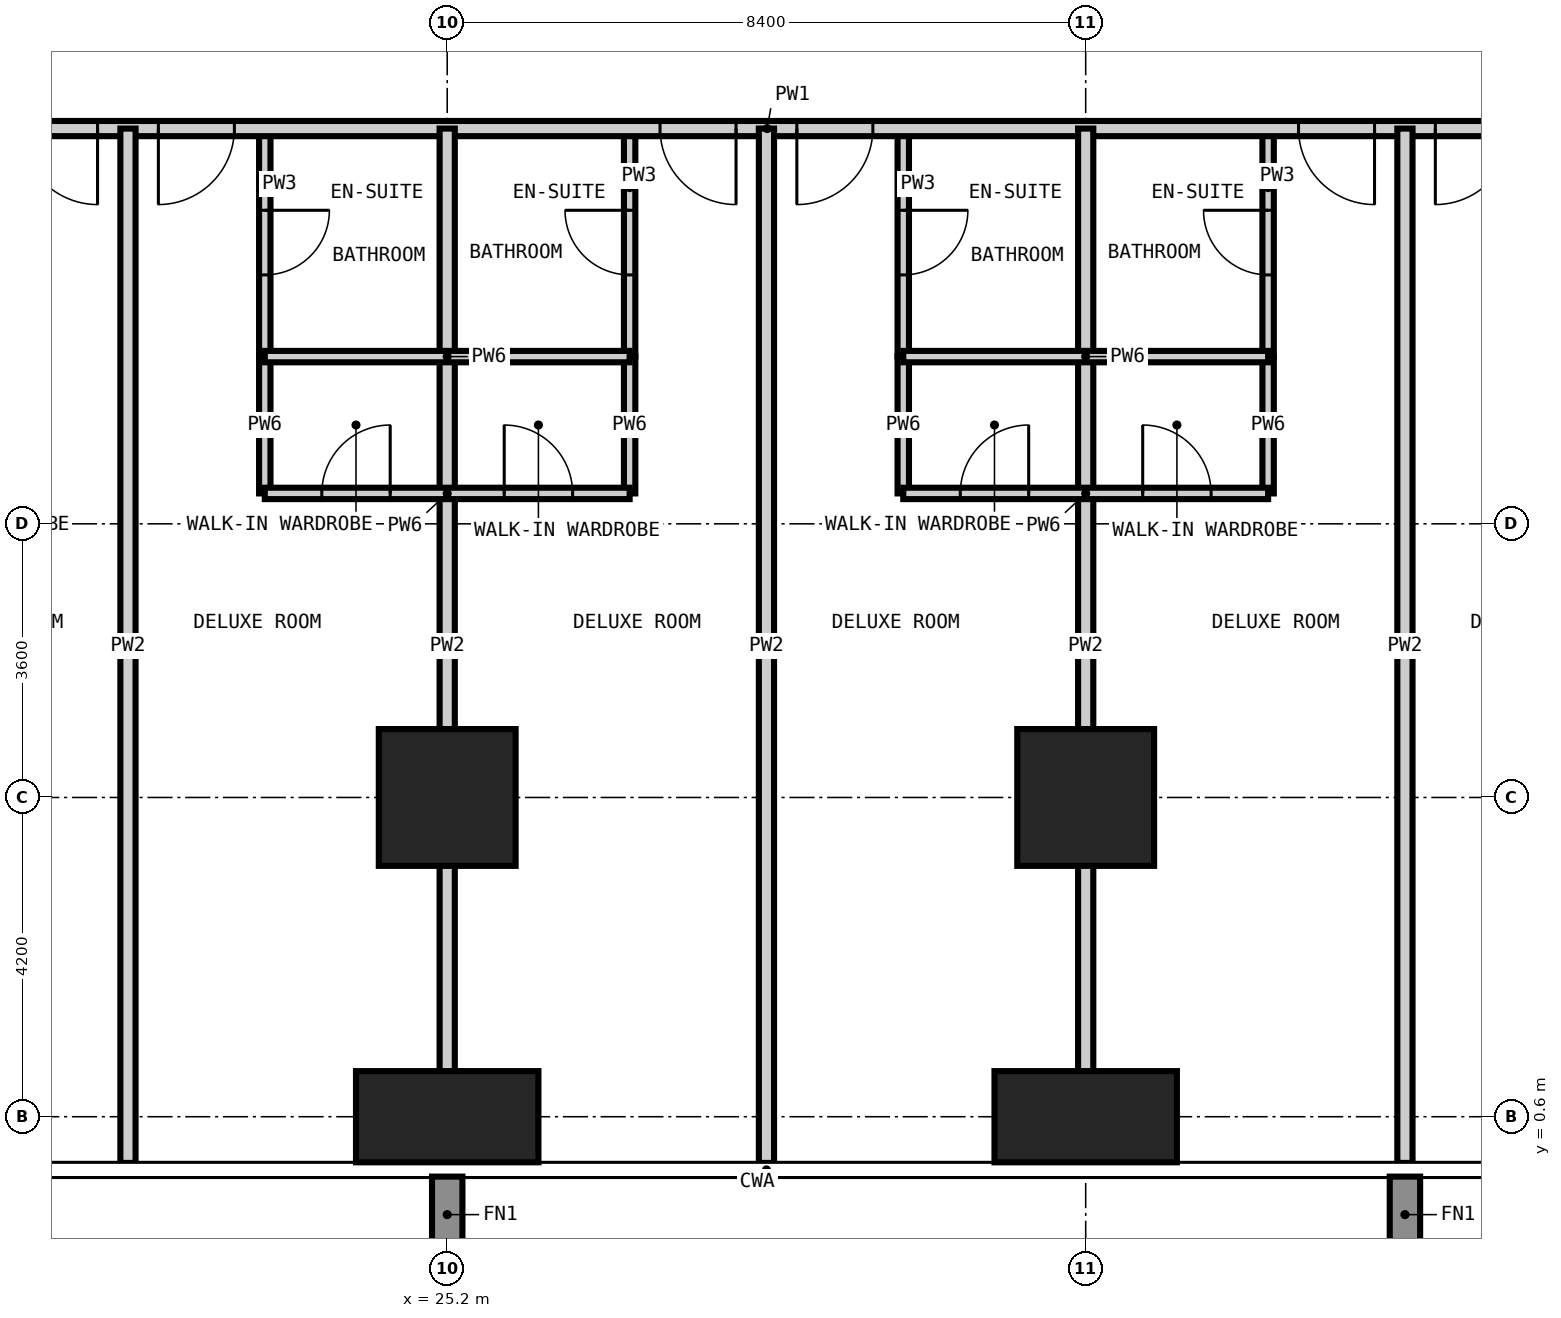
"""IFC4 building model, lengths in metres.
Left out: names, types, materials, properties, quantities, classifications, styles, units other than length and angle.
Written with IfcOpenShell. Run it as: python <this file> out.ifc"""

import sys

from ifc_helpers import new_model, si_unit, direction, frame, frame_2d, origin, origin_2d, place, context, subcontext, project, spatial, rectangle, extrude, element, fill, save


model = new_model("IFC4")
c1 = context("Model", 3, precision=1e-05, world=origin(), true_north=direction((0.0, 1.0)))
c2 = subcontext(c1, "Body", "Model", "MODEL_VIEW")
j1 = project(units=[si_unit("LENGTHUNIT", "METRE"), si_unit("PLANEANGLEUNIT", "RADIAN")], contexts=[c1])
p1 = place(None, origin())
s1 = spatial("IfcSite", under=j1, at=p1, CompositionType="ELEMENT")
p2 = place(p1, origin())
s2 = spatial("IfcBuilding", under=s1, at=p2, CompositionType="ELEMENT")
p3 = place(p2, frame((0.0, 0.0, 30.6)))
s3 = spatial("IfcBuildingStorey", under=s2, at=p3, CompositionType="ELEMENT", Elevation=30.6)
p4 = place(p3, frame((25.2, 0.6, -0.35), z_axis=(0.0, 0.0, 1.0), x_axis=(1.0, 0.0, 0.0)))
e1 = element("IfcColumn", 1, at=p4, inside=s3, PredefinedType="COLUMN", context=c2, shape_type="SweptSolid", body=[
    extrude(rectangle(XDim=2.4, YDim=1.2, at=origin_2d()), origin(), (0.0, 0.0, 1.0), 3.6),
])
p5 = place(p3, frame((25.2, 4.8, -0.35), z_axis=(0.0, 0.0, 1.0), x_axis=(1.0, 0.0, 0.0)))
e2 = element("IfcColumn", 2, at=p5, inside=s3, PredefinedType="COLUMN", context=c2, shape_type="SweptSolid", body=[
    extrude(rectangle(XDim=1.8, YDim=1.8, at=origin_2d()), origin(), (0.0, 0.0, 1.0), 3.6),
])
p6 = place(p3, frame((33.6, 0.6, -0.35), z_axis=(0.0, 0.0, 1.0), x_axis=(1.0, 0.0, 0.0)))
e3 = element("IfcColumn", 3, at=p6, inside=s3, PredefinedType="COLUMN", context=c2, shape_type="SweptSolid", body=[
    extrude(rectangle(XDim=2.4, YDim=1.2, at=origin_2d()), origin(), (0.0, 0.0, 1.0), 3.6),
])
p7 = place(p3, frame((33.6, 4.8, -0.35), z_axis=(0.0, 0.0, 1.0), x_axis=(1.0, 0.0, 0.0)))
e4 = element("IfcColumn", 4, at=p7, inside=s3, PredefinedType="COLUMN", context=c2, shape_type="SweptSolid", body=[
    extrude(rectangle(XDim=1.8, YDim=1.8, at=origin_2d()), origin(), (0.0, 0.0, 1.0), 3.6),
])
p8 = place(p3, frame((22.8, 10.6, 0.0), z_axis=(0.0, 0.0, 1.0), x_axis=(0.0, 1.0, 0.0)))
e5 = element("IfcWall", 5, at=p8, inside=s3, PredefinedType="PARTITIONING", context=c2, shape_type="SweptSolid", body=[
    extrude(rectangle(XDim=3.0, YDim=0.15, at=frame_2d((1.5, 0.0))), origin(), (0.0, 0.0, 1.0), 3.25),
])
p9 = place(p8, frame((1.075, 0.0, 0.0)))
e6 = element("IfcOpeningElement", 6, at=p9, cuts=e5, PredefinedType="OPENING", context=c2, shape_type="SweptSolid", body=[
    extrude(rectangle(XDim=0.85, YDim=2.1, at=frame_2d((0.425, 1.05))), frame((0.0, 0.085, 0.0), z_axis=(0.0, -1.0, 0.0), x_axis=(1.0, 0.0, 0.0)), (0.0, 0.0, 1.0), 0.17),
])
p10 = place(p3, frame((27.6, 10.6, 0.0), z_axis=(0.0, 0.0, 1.0), x_axis=(0.0, 1.0, 0.0)))
e7 = element("IfcWall", 7, at=p10, inside=s3, PredefinedType="PARTITIONING", context=c2, shape_type="SweptSolid", body=[
    extrude(rectangle(XDim=3.0, YDim=0.15, at=frame_2d((1.5, 0.0))), origin(), (0.0, 0.0, 1.0), 3.25),
])
p11 = place(p10, frame((1.075, 0.0, 0.0)))
e8 = element("IfcOpeningElement", 8, at=p11, cuts=e7, PredefinedType="OPENING", context=c2, shape_type="SweptSolid", body=[
    extrude(rectangle(XDim=0.85, YDim=2.1, at=frame_2d((0.425, 1.05))), frame((0.0, 0.085, 0.0), z_axis=(0.0, -1.0, 0.0), x_axis=(1.0, 0.0, 0.0)), (0.0, 0.0, 1.0), 0.17),
])
p12 = place(p3, frame((31.2, 10.6, 0.0), z_axis=(0.0, 0.0, 1.0), x_axis=(0.0, 1.0, 0.0)))
e9 = element("IfcWall", 9, at=p12, inside=s3, PredefinedType="PARTITIONING", context=c2, shape_type="SweptSolid", body=[
    extrude(rectangle(XDim=3.0, YDim=0.15, at=frame_2d((1.5, 0.0))), origin(), (0.0, 0.0, 1.0), 3.25),
])
p13 = place(p12, frame((1.075, 0.0, 0.0)))
e10 = element("IfcOpeningElement", 10, at=p13, cuts=e9, PredefinedType="OPENING", context=c2, shape_type="SweptSolid", body=[
    extrude(rectangle(XDim=0.85, YDim=2.1, at=frame_2d((0.425, 1.05))), frame((0.0, 0.085, 0.0), z_axis=(0.0, -1.0, 0.0), x_axis=(1.0, 0.0, 0.0)), (0.0, 0.0, 1.0), 0.17),
])
p14 = place(p3, frame((36.0, 10.6, 0.0), z_axis=(0.0, 0.0, 1.0), x_axis=(0.0, 1.0, 0.0)))
e11 = element("IfcWall", 11, at=p14, inside=s3, PredefinedType="PARTITIONING", context=c2, shape_type="SweptSolid", body=[
    extrude(rectangle(XDim=3.0, YDim=0.15, at=frame_2d((1.5, 0.0))), origin(), (0.0, 0.0, 1.0), 3.25),
])
p15 = place(p14, frame((1.075, 0.0, 0.0)))
e12 = element("IfcOpeningElement", 12, at=p15, cuts=e11, PredefinedType="OPENING", context=c2, shape_type="SweptSolid", body=[
    extrude(rectangle(XDim=0.85, YDim=2.1, at=frame_2d((0.425, 1.05))), frame((0.0, 0.085, 0.0), z_axis=(0.0, -1.0, 0.0), x_axis=(1.0, 0.0, 0.0)), (0.0, 0.0, 1.0), 0.17),
])
p16 = place(p3, frame((45.5, 13.6, 0.0), z_axis=(0.0, 0.0, 1.0), x_axis=(-1.0, 0.0, 0.0)))
e13 = element("IfcWall", 13, at=p16, inside=s3, PredefinedType="PARTITIONING", context=c2, shape_type="SweptSolid", body=[
    extrude(rectangle(XDim=31.9, YDim=0.2, at=frame_2d((15.95, 0.0))), origin(), (0.0, 0.0, 1.0), 3.25),
])
p17 = place(p16, frame((24.9, 0.0, 0.0)))
e14 = element("IfcOpeningElement", 14, at=p17, cuts=e13, PredefinedType="OPENING", context=c2, shape_type="SweptSolid", body=[
    extrude(rectangle(XDim=1.0, YDim=2.2, at=frame_2d((0.5, 1.1))), frame((0.0, 0.11, 0.0), z_axis=(0.0, -1.0, 0.0), x_axis=(1.0, 0.0, 0.0)), (0.0, 0.0, 1.0), 0.22),
])
p18 = place(p16, frame((23.1, 0.0, 0.0)))
e15 = element("IfcOpeningElement", 15, at=p18, cuts=e13, PredefinedType="OPENING", context=c2, shape_type="SweptSolid", body=[
    extrude(rectangle(XDim=1.0, YDim=2.2, at=frame_2d((0.5, 1.1))), frame((0.0, 0.11, 0.0), z_axis=(0.0, -1.0, 0.0), x_axis=(1.0, 0.0, 0.0)), (0.0, 0.0, 1.0), 0.22),
])
p19 = place(p16, frame((16.5, 0.0, 0.0)))
e16 = element("IfcOpeningElement", 16, at=p19, cuts=e13, PredefinedType="OPENING", context=c2, shape_type="SweptSolid", body=[
    extrude(rectangle(XDim=1.0, YDim=2.2, at=frame_2d((0.5, 1.1))), frame((0.0, 0.11, 0.0), z_axis=(0.0, -1.0, 0.0), x_axis=(1.0, 0.0, 0.0)), (0.0, 0.0, 1.0), 0.22),
])
p20 = place(p16, frame((14.7, 0.0, 0.0)))
e17 = element("IfcOpeningElement", 17, at=p20, cuts=e13, PredefinedType="OPENING", context=c2, shape_type="SweptSolid", body=[
    extrude(rectangle(XDim=1.0, YDim=2.2, at=frame_2d((0.5, 1.1))), frame((0.0, 0.11, 0.0), z_axis=(0.0, -1.0, 0.0), x_axis=(1.0, 0.0, 0.0)), (0.0, 0.0, 1.0), 0.22),
])
p21 = place(p16, frame((8.1, 0.0, 0.0)))
e18 = element("IfcOpeningElement", 18, at=p21, cuts=e13, PredefinedType="OPENING", context=c2, shape_type="SweptSolid", body=[
    extrude(rectangle(XDim=1.0, YDim=2.2, at=frame_2d((0.5, 1.1))), frame((0.0, 0.11, 0.0), z_axis=(0.0, -1.0, 0.0), x_axis=(1.0, 0.0, 0.0)), (0.0, 0.0, 1.0), 0.22),
])
p22 = place(p16, frame((6.3, 0.0, 0.0)))
e19 = element("IfcOpeningElement", 19, at=p22, cuts=e13, PredefinedType="OPENING", context=c2, shape_type="SweptSolid", body=[
    extrude(rectangle(XDim=1.0, YDim=2.2, at=frame_2d((0.5, 1.1))), frame((0.0, 0.11, 0.0), z_axis=(0.0, -1.0, 0.0), x_axis=(1.0, 0.0, 0.0)), (0.0, 0.0, 1.0), 0.22),
])
for number, where, z_axis, x_axis in (
    (20, (21.0, -0.008, 0.0), (0.0, 0.0, 1.0), (0.0, 1.0, 0.0)),
    (21, (25.2, -0.008, 0.0), (0.0, 0.0, 1.0), (0.0, 1.0, 0.0)),
    (22, (29.4, -0.008, 0.0), (0.0, 0.0, 1.0), (0.0, 1.0, 0.0)),
    (23, (33.6, -0.008, 0.0), (0.0, 0.0, 1.0), (0.0, 1.0, 0.0)),
    (24, (37.8, -0.008, 0.0), (0.0, 0.0, 1.0), (0.0, 1.0, 0.0)),
):
    element("IfcWall", number, at=place(p3, frame(where, z_axis=z_axis, x_axis=x_axis)), inside=s3, PredefinedType="PARTITIONING", context=c2, shape_type="SweptSolid", body=[
        extrude(rectangle(XDim=13.608, YDim=0.2, at=frame_2d((6.804, 0.0))), origin(), (0.0, 0.0, 1.0), 3.25),
    ])
for number, where, z_axis, x_axis in (
    (25, (22.8, 8.8, 0.0), (0.0, 0.0, 1.0), (0.0, 1.0, 0.0)),
    (26, (27.6, 8.8, 0.0), (0.0, 0.0, 1.0), (0.0, 1.0, 0.0)),
    (27, (31.2, 8.8, 0.0), (0.0, 0.0, 1.0), (0.0, 1.0, 0.0)),
    (28, (36.0, 8.8, 0.0), (0.0, 0.0, 1.0), (0.0, 1.0, 0.0)),
):
    element("IfcWall", number, at=place(p3, frame(where, z_axis=z_axis, x_axis=x_axis)), inside=s3, PredefinedType="PARTITIONING", context=c2, shape_type="SweptSolid", body=[
        extrude(rectangle(XDim=1.8, YDim=0.15, at=frame_2d((0.9, 0.0))), origin(), (0.0, 0.0, 1.0), 3.25),
    ])
p23 = place(p3, frame((22.8, 8.8, 0.0), z_axis=(0.0, 0.0, 1.0), x_axis=(1.0, 0.0, 0.0)))
e29 = element("IfcWall", 29, at=p23, inside=s3, PredefinedType="PARTITIONING", context=c2, shape_type="SweptSolid", body=[
    extrude(rectangle(XDim=4.8, YDim=0.15, at=frame_2d((2.4, 0.0))), origin(), (0.0, 0.0, 1.0), 3.25),
])
p24 = place(p23, frame((0.75, 0.0, 0.0)))
e30 = element("IfcOpeningElement", 30, at=p24, cuts=e29, PredefinedType="OPENING", context=c2, shape_type="SweptSolid", body=[
    extrude(rectangle(XDim=0.9, YDim=2.1, at=frame_2d((0.45, 1.05))), frame((0.0, 0.085, 0.0), z_axis=(0.0, -1.0, 0.0), x_axis=(1.0, 0.0, 0.0)), (0.0, 0.0, 1.0), 0.17),
])
p25 = place(p23, frame((3.15, 0.0, 0.0)))
e31 = element("IfcOpeningElement", 31, at=p25, cuts=e29, PredefinedType="OPENING", context=c2, shape_type="SweptSolid", body=[
    extrude(rectangle(XDim=0.9, YDim=2.1, at=frame_2d((0.45, 1.05))), frame((0.0, 0.085, 0.0), z_axis=(0.0, -1.0, 0.0), x_axis=(1.0, 0.0, 0.0)), (0.0, 0.0, 1.0), 0.17),
])
p26 = place(p3, frame((31.2, 8.8, 0.0), z_axis=(0.0, 0.0, 1.0), x_axis=(1.0, 0.0, 0.0)))
e32 = element("IfcWall", 32, at=p26, inside=s3, PredefinedType="PARTITIONING", context=c2, shape_type="SweptSolid", body=[
    extrude(rectangle(XDim=4.8, YDim=0.15, at=frame_2d((2.4, 0.0))), origin(), (0.0, 0.0, 1.0), 3.25),
])
p27 = place(p26, frame((0.75, 0.0, 0.0)))
e33 = element("IfcOpeningElement", 33, at=p27, cuts=e32, PredefinedType="OPENING", context=c2, shape_type="SweptSolid", body=[
    extrude(rectangle(XDim=0.9, YDim=2.1, at=frame_2d((0.45, 1.05))), frame((0.0, 0.085, 0.0), z_axis=(0.0, -1.0, 0.0), x_axis=(1.0, 0.0, 0.0)), (0.0, 0.0, 1.0), 0.17),
])
p28 = place(p26, frame((3.15, 0.0, 0.0)))
e34 = element("IfcOpeningElement", 34, at=p28, cuts=e32, PredefinedType="OPENING", context=c2, shape_type="SweptSolid", body=[
    extrude(rectangle(XDim=0.9, YDim=2.1, at=frame_2d((0.45, 1.05))), frame((0.0, 0.085, 0.0), z_axis=(0.0, -1.0, 0.0), x_axis=(1.0, 0.0, 0.0)), (0.0, 0.0, 1.0), 0.17),
])
for number, where, z_axis, x_axis in (
    (35, (22.8, 10.6, 0.0), (0.0, 0.0, 1.0), (1.0, 0.0, 0.0)),
    (36, (31.2, 10.6, 0.0), (0.0, 0.0, 1.0), (1.0, 0.0, 0.0)),
):
    element("IfcWall", number, at=place(p3, frame(where, z_axis=z_axis, x_axis=x_axis)), inside=s3, PredefinedType="PARTITIONING", context=c2, shape_type="SweptSolid", body=[
        extrude(rectangle(XDim=4.8, YDim=0.15, at=frame_2d((2.4, 0.0))), origin(), (0.0, 0.0, 1.0), 3.25),
    ])
p29 = place(p17, origin())
e37 = element("IfcDoor", 37, at=p29, inside=s3, OperationType="SINGLE_SWING_LEFT", PredefinedType="DOOR", context=c2, shape_type="SweptSolid", body=[
    extrude(rectangle(XDim=1.0, YDim=2.2, at=frame_2d((0.5, 1.1))), frame((0.0, 0.025, 0.0), z_axis=(0.0, -1.0, 0.0), x_axis=(1.0, 0.0, 0.0)), (0.0, 0.0, 1.0), 0.05),
])
fill(e14, e37)
p30 = place(p18, origin())
e38 = element("IfcDoor", 38, at=p30, inside=s3, OperationType="SINGLE_SWING_RIGHT", PredefinedType="DOOR", context=c2, shape_type="SweptSolid", body=[
    extrude(rectangle(XDim=1.0, YDim=2.2, at=frame_2d((0.5, 1.1))), frame((0.0, 0.025, 0.0), z_axis=(0.0, -1.0, 0.0), x_axis=(1.0, 0.0, 0.0)), (0.0, 0.0, 1.0), 0.05),
])
fill(e15, e38)
p31 = place(p9, frame((0.85, 0.0, 0.0), z_axis=(0.0, 0.0, 1.0), x_axis=(-1.0, 0.0, 0.0)))
e39 = element("IfcDoor", 39, at=p31, inside=s3, OperationType="SINGLE_SWING_LEFT", PredefinedType="DOOR", context=c2, shape_type="SweptSolid", body=[
    extrude(rectangle(XDim=0.85, YDim=2.1, at=frame_2d((0.425, 1.05))), frame((0.0, 0.025, 0.0), z_axis=(0.0, -1.0, 0.0), x_axis=(1.0, 0.0, 0.0)), (0.0, 0.0, 1.0), 0.05),
])
fill(e6, e39)
p32 = place(p24, origin())
e40 = element("IfcDoor", 40, at=p32, inside=s3, OperationType="SINGLE_SWING_RIGHT", PredefinedType="DOOR", context=c2, shape_type="SweptSolid", body=[
    extrude(rectangle(XDim=0.9, YDim=2.1, at=frame_2d((0.45, 1.05))), frame((0.0, 0.025, 0.0), z_axis=(0.0, -1.0, 0.0), x_axis=(1.0, 0.0, 0.0)), (0.0, 0.0, 1.0), 0.05),
])
fill(e30, e40)
p33 = place(p19, origin())
e41 = element("IfcDoor", 41, at=p33, inside=s3, OperationType="SINGLE_SWING_LEFT", PredefinedType="DOOR", context=c2, shape_type="SweptSolid", body=[
    extrude(rectangle(XDim=1.0, YDim=2.2, at=frame_2d((0.5, 1.1))), frame((0.0, 0.025, 0.0), z_axis=(0.0, -1.0, 0.0), x_axis=(1.0, 0.0, 0.0)), (0.0, 0.0, 1.0), 0.05),
])
fill(e16, e41)
p34 = place(p11, origin())
e42 = element("IfcDoor", 42, at=p34, inside=s3, OperationType="SINGLE_SWING_RIGHT", PredefinedType="DOOR", context=c2, shape_type="SweptSolid", body=[
    extrude(rectangle(XDim=0.85, YDim=2.1, at=frame_2d((0.425, 1.05))), frame((0.0, 0.025, 0.0), z_axis=(0.0, -1.0, 0.0), x_axis=(1.0, 0.0, 0.0)), (0.0, 0.0, 1.0), 0.05),
])
fill(e8, e42)
p35 = place(p25, origin())
e43 = element("IfcDoor", 43, at=p35, inside=s3, OperationType="SINGLE_SWING_LEFT", PredefinedType="DOOR", context=c2, shape_type="SweptSolid", body=[
    extrude(rectangle(XDim=0.9, YDim=2.1, at=frame_2d((0.45, 1.05))), frame((0.0, 0.025, 0.0), z_axis=(0.0, -1.0, 0.0), x_axis=(1.0, 0.0, 0.0)), (0.0, 0.0, 1.0), 0.05),
])
fill(e31, e43)
p36 = place(p20, origin())
e44 = element("IfcDoor", 44, at=p36, inside=s3, OperationType="SINGLE_SWING_RIGHT", PredefinedType="DOOR", context=c2, shape_type="SweptSolid", body=[
    extrude(rectangle(XDim=1.0, YDim=2.2, at=frame_2d((0.5, 1.1))), frame((0.0, 0.025, 0.0), z_axis=(0.0, -1.0, 0.0), x_axis=(1.0, 0.0, 0.0)), (0.0, 0.0, 1.0), 0.05),
])
fill(e17, e44)
p37 = place(p13, frame((0.85, 0.0, 0.0), z_axis=(0.0, 0.0, 1.0), x_axis=(-1.0, 0.0, 0.0)))
e45 = element("IfcDoor", 45, at=p37, inside=s3, OperationType="SINGLE_SWING_LEFT", PredefinedType="DOOR", context=c2, shape_type="SweptSolid", body=[
    extrude(rectangle(XDim=0.85, YDim=2.1, at=frame_2d((0.425, 1.05))), frame((0.0, 0.025, 0.0), z_axis=(0.0, -1.0, 0.0), x_axis=(1.0, 0.0, 0.0)), (0.0, 0.0, 1.0), 0.05),
])
fill(e10, e45)
p38 = place(p27, origin())
e46 = element("IfcDoor", 46, at=p38, inside=s3, OperationType="SINGLE_SWING_RIGHT", PredefinedType="DOOR", context=c2, shape_type="SweptSolid", body=[
    extrude(rectangle(XDim=0.9, YDim=2.1, at=frame_2d((0.45, 1.05))), frame((0.0, 0.025, 0.0), z_axis=(0.0, -1.0, 0.0), x_axis=(1.0, 0.0, 0.0)), (0.0, 0.0, 1.0), 0.05),
])
fill(e33, e46)
p39 = place(p21, origin())
e47 = element("IfcDoor", 47, at=p39, inside=s3, OperationType="SINGLE_SWING_LEFT", PredefinedType="DOOR", context=c2, shape_type="SweptSolid", body=[
    extrude(rectangle(XDim=1.0, YDim=2.2, at=frame_2d((0.5, 1.1))), frame((0.0, 0.025, 0.0), z_axis=(0.0, -1.0, 0.0), x_axis=(1.0, 0.0, 0.0)), (0.0, 0.0, 1.0), 0.05),
])
fill(e18, e47)
p40 = place(p15, origin())
e48 = element("IfcDoor", 48, at=p40, inside=s3, OperationType="SINGLE_SWING_RIGHT", PredefinedType="DOOR", context=c2, shape_type="SweptSolid", body=[
    extrude(rectangle(XDim=0.85, YDim=2.1, at=frame_2d((0.425, 1.05))), frame((0.0, 0.025, 0.0), z_axis=(0.0, -1.0, 0.0), x_axis=(1.0, 0.0, 0.0)), (0.0, 0.0, 1.0), 0.05),
])
fill(e12, e48)
p41 = place(p28, origin())
e49 = element("IfcDoor", 49, at=p41, inside=s3, OperationType="SINGLE_SWING_LEFT", PredefinedType="DOOR", context=c2, shape_type="SweptSolid", body=[
    extrude(rectangle(XDim=0.9, YDim=2.1, at=frame_2d((0.45, 1.05))), frame((0.0, 0.025, 0.0), z_axis=(0.0, -1.0, 0.0), x_axis=(1.0, 0.0, 0.0)), (0.0, 0.0, 1.0), 0.05),
])
fill(e34, e49)
p42 = place(p22, origin())
e50 = element("IfcDoor", 50, at=p42, inside=s3, OperationType="SINGLE_SWING_RIGHT", PredefinedType="DOOR", context=c2, shape_type="SweptSolid", body=[
    extrude(rectangle(XDim=1.0, YDim=2.2, at=frame_2d((0.5, 1.1))), frame((0.0, 0.025, 0.0), z_axis=(0.0, -1.0, 0.0), x_axis=(1.0, 0.0, 0.0)), (0.0, 0.0, 1.0), 0.05),
])
fill(e19, e50)
save(model, sys.argv[1])
